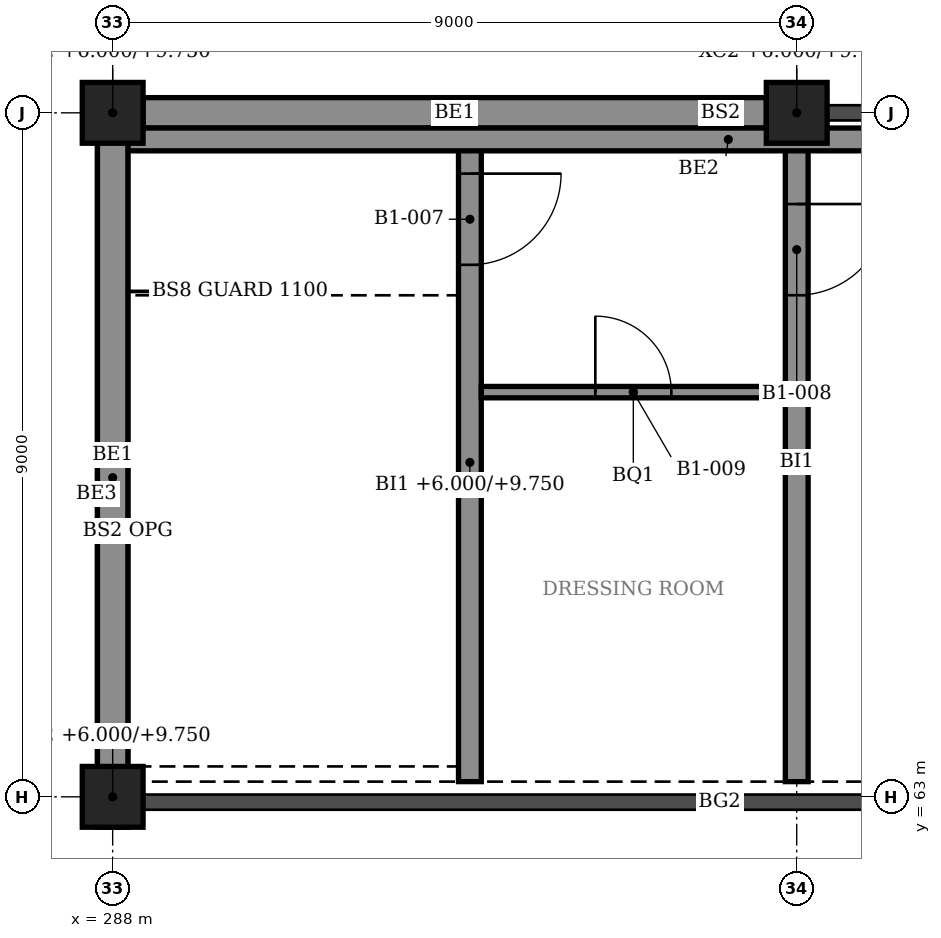
"""IFC4 building model, lengths in metres.
Left out: names, types, materials, properties, quantities, classifications, styles, units other than length and angle.
Written with IfcOpenShell. Run it as: python <this file> out.ifc"""

import sys

from ifc_helpers import new_model, si_unit, direction, frame, frame_2d, origin, origin_2d, place, context, subcontext, project, spatial, rectangle, extrude, element, fill, save


model = new_model("IFC4")
c1 = context("Model", 3, precision=1e-05, world=origin(), true_north=direction((0.0, 1.0)))
c2 = subcontext(c1, "Body", "Model", "MODEL_VIEW")
j1 = project(units=[si_unit("LENGTHUNIT", "METRE"), si_unit("PLANEANGLEUNIT", "RADIAN")], contexts=[c1])
p1 = place(None, origin())
s1 = spatial("IfcSite", under=j1, at=p1, CompositionType="ELEMENT")
p2 = place(p1, origin())
s2 = spatial("IfcBuilding", under=s1, at=p2, CompositionType="ELEMENT")
p3 = place(p2, frame((0.0, 0.0, 6.0)))
s3 = spatial("IfcBuildingStorey", under=s2, at=p3, CompositionType="ELEMENT", Elevation=6.0)
for number, where, z_axis, x_axis in (
    (1, (288.0, 63.0, 0.0), (0.0, 0.0, 1.0), (1.0, 0.0, 0.0)),
    (2, (288.0, 72.0, 0.0), (0.0, 0.0, 1.0), (1.0, 0.0, 0.0)),
    (3, (297.0, 72.0, 0.0), (0.0, 0.0, 1.0), (1.0, 0.0, 0.0)),
):
    element("IfcColumn", number, at=place(p3, frame(where, z_axis=z_axis, x_axis=x_axis)), inside=s3, PredefinedType="COLUMN", context=c2, shape_type="SweptSolid", body=[
        extrude(rectangle(XDim=0.8, YDim=0.8, at=origin_2d()), origin(), (0.0, 0.0, 1.0), 3.75),
    ])
p4 = place(p2, origin())
s4 = spatial("IfcBuildingStorey", under=s2, at=p4, CompositionType="ELEMENT", Elevation=0.0)
p5 = place(p4, frame((288.4, 63.0, -0.3), z_axis=(0.0, 0.0, 1.0), x_axis=(1.0, 0.0, 0.0)))
e4 = element("IfcWall", 4, at=p5, inside=s4, PredefinedType="SHEAR", context=c2, shape_type="SweptSolid", body=[
    extrude(rectangle(XDim=62.2, YDim=0.4, at=frame_2d((31.1, 0.0))), origin(), (0.0, 0.0, 1.0), 10.625),
])
p6 = place(p5, frame((14.25, 0.0, 0.3)))
e5 = element("IfcOpeningElement", 5, at=p6, cuts=e4, PredefinedType="OPENING", context=c2, shape_type="SweptSolid", body=[
    extrude(rectangle(XDim=2.7, YDim=2.4, at=frame_2d((1.35, 1.2))), frame((0.0, 0.21, 0.0), z_axis=(0.0, -1.0, 0.0), x_axis=(1.0, 0.0, 0.0)), (0.0, 0.0, 1.0), 0.42),
])
p7 = place(p5, frame((19.45, 0.0, 0.3)))
e6 = element("IfcOpeningElement", 6, at=p7, cuts=e4, PredefinedType="OPENING", context=c2, shape_type="SweptSolid", body=[
    extrude(rectangle(XDim=2.7, YDim=2.4, at=frame_2d((1.35, 1.2))), frame((0.0, 0.21, 0.0), z_axis=(0.0, -1.0, 0.0), x_axis=(1.0, 0.0, 0.0)), (0.0, 0.0, 1.0), 0.42),
])
p8 = place(p5, frame((24.65, 0.0, 0.3)))
e7 = element("IfcOpeningElement", 7, at=p8, cuts=e4, PredefinedType="OPENING", context=c2, shape_type="SweptSolid", body=[
    extrude(rectangle(XDim=2.7, YDim=2.4, at=frame_2d((1.35, 1.2))), frame((0.0, 0.21, 0.0), z_axis=(0.0, -1.0, 0.0), x_axis=(1.0, 0.0, 0.0)), (0.0, 0.0, 1.0), 0.42),
])
p9 = place(p5, frame((29.85, 0.0, 0.3)))
e8 = element("IfcOpeningElement", 8, at=p9, cuts=e4, PredefinedType="OPENING", context=c2, shape_type="SweptSolid", body=[
    extrude(rectangle(XDim=2.7, YDim=2.4, at=frame_2d((1.35, 1.2))), frame((0.0, 0.21, 0.0), z_axis=(0.0, -1.0, 0.0), x_axis=(1.0, 0.0, 0.0)), (0.0, 0.0, 1.0), 0.42),
])
p10 = place(p5, frame((35.05, 0.0, 0.3)))
e9 = element("IfcOpeningElement", 9, at=p10, cuts=e4, PredefinedType="OPENING", context=c2, shape_type="SweptSolid", body=[
    extrude(rectangle(XDim=2.7, YDim=2.4, at=frame_2d((1.35, 1.2))), frame((0.0, 0.21, 0.0), z_axis=(0.0, -1.0, 0.0), x_axis=(1.0, 0.0, 0.0)), (0.0, 0.0, 1.0), 0.42),
])
p11 = place(p5, frame((40.25, 0.0, 0.3)))
e10 = element("IfcOpeningElement", 10, at=p11, cuts=e4, PredefinedType="OPENING", context=c2, shape_type="SweptSolid", body=[
    extrude(rectangle(XDim=2.7, YDim=2.4, at=frame_2d((1.35, 1.2))), frame((0.0, 0.21, 0.0), z_axis=(0.0, -1.0, 0.0), x_axis=(1.0, 0.0, 0.0)), (0.0, 0.0, 1.0), 0.42),
])
p12 = place(p5, frame((45.45, 0.0, 0.3)))
e11 = element("IfcOpeningElement", 11, at=p12, cuts=e4, PredefinedType="OPENING", context=c2, shape_type="SweptSolid", body=[
    extrude(rectangle(XDim=2.7, YDim=2.4, at=frame_2d((1.35, 1.2))), frame((0.0, 0.21, 0.0), z_axis=(0.0, -1.0, 0.0), x_axis=(1.0, 0.0, 0.0)), (0.0, 0.0, 1.0), 0.42),
])
for number, where, z_axis, x_axis in (
    (12, (288.0, 63.4, 0.0), (0.0, 0.0, 1.0), (0.0, 1.0, 0.0)),
    (13, (288.4, 72.0, 0.0), (0.0, 0.0, 1.0), (1.0, 0.0, 0.0)),
):
    element("IfcWall", number, at=place(p3, frame(where, z_axis=z_axis, x_axis=x_axis)), inside=s3, PredefinedType="STANDARD", context=c2, shape_type="SweptSolid", body=[
        extrude(rectangle(XDim=8.2, YDim=0.4, at=frame_2d((4.1, 0.0))), origin(), (0.0, 0.0, 1.0), 3.05),
    ])
p13 = place(p3, frame((288.0, 62.6, 4.0), z_axis=(0.0, 0.0, 1.0), x_axis=(0.0, 1.0, 0.0)))
e14 = element("IfcWall", 14, at=p13, inside=s3, PredefinedType="PARAPET", context=c2, shape_type="SweptSolid", body=[
    extrude(rectangle(XDim=9.2, YDim=0.4, at=frame_2d((4.6, 0.0))), origin(), (0.0, 0.0, 1.0), 1.121),
])
p14 = place(p3, frame((288.2, 71.65, 4.0), z_axis=(0.0, 0.0, 1.0), x_axis=(1.0, 0.0, 0.0)))
e15 = element("IfcWall", 15, at=p14, inside=s3, PredefinedType="PARAPET", context=c2, shape_type="SweptSolid", body=[
    extrude(rectangle(XDim=62.6, YDim=0.3, at=frame_2d((31.3, 0.0))), origin(), (0.0, 0.0, 1.0), 1.121),
])
p15 = place(p3, frame((292.7, 63.2, 0.0), z_axis=(0.0, 0.0, 1.0), x_axis=(0.0, 1.0, 0.0)))
e16 = element("IfcWall", 16, at=p15, inside=s3, PredefinedType="STANDARD", context=c2, shape_type="SweptSolid", body=[
    extrude(rectangle(XDim=8.4, YDim=0.3, at=frame_2d((4.2, 0.0))), origin(), (0.0, 0.0, 1.0), 3.75),
])
p16 = place(p15, frame((6.8, 0.0, 0.0)))
e17 = element("IfcOpeningElement", 17, at=p16, cuts=e16, PredefinedType="OPENING", context=c2, shape_type="SweptSolid", body=[
    extrude(rectangle(XDim=1.2, YDim=2.4, at=frame_2d((0.6, 1.2))), frame((0.0, 0.16, 0.0), z_axis=(0.0, -1.0, 0.0), x_axis=(1.0, 0.0, 0.0)), (0.0, 0.0, 1.0), 0.32),
])
p17 = place(p3, frame((297.0, 63.2, 0.0), z_axis=(0.0, 0.0, 1.0), x_axis=(0.0, 1.0, 0.0)))
e18 = element("IfcWall", 18, at=p17, inside=s3, PredefinedType="STANDARD", context=c2, shape_type="SweptSolid", body=[
    extrude(rectangle(XDim=8.4, YDim=0.3, at=frame_2d((4.2, 0.0))), origin(), (0.0, 0.0, 1.0), 3.05),
])
p18 = place(p17, frame((6.4, 0.0, 0.0)))
e19 = element("IfcOpeningElement", 19, at=p18, cuts=e18, PredefinedType="OPENING", context=c2, shape_type="SweptSolid", body=[
    extrude(rectangle(XDim=1.2, YDim=2.4, at=frame_2d((0.6, 1.2))), frame((0.0, 0.16, 0.0), z_axis=(0.0, -1.0, 0.0), x_axis=(1.0, 0.0, 0.0)), (0.0, 0.0, 1.0), 0.32),
])
p19 = place(p3, frame((292.85, 68.325, 0.0), z_axis=(0.0, 0.0, 1.0), x_axis=(1.0, 0.0, 0.0)))
e20 = element("IfcWall", 20, at=p19, inside=s3, PredefinedType="PARTITIONING", context=c2, shape_type="SweptSolid", body=[
    extrude(rectangle(XDim=4.0, YDim=0.15, at=frame_2d((2.0, 0.0))), origin(), (0.0, 0.0, 1.0), 3.75),
])
p20 = place(p19, frame((1.5, 0.0, 0.0)))
e21 = element("IfcOpeningElement", 21, at=p20, cuts=e20, PredefinedType="OPENING", context=c2, shape_type="SweptSolid", body=[
    extrude(rectangle(XDim=1.0, YDim=2.4, at=frame_2d((0.5, 1.2))), frame((0.0, 0.085, 0.0), z_axis=(0.0, -1.0, 0.0), x_axis=(1.0, 0.0, 0.0)), (0.0, 0.0, 1.0), 0.17),
])
p21 = place(p16, frame((1.2, 0.0, 0.0), z_axis=(0.0, 0.0, 1.0), x_axis=(-1.0, 0.0, 0.0)))
e22 = element("IfcDoor", 22, at=p21, inside=s3, OperationType="SINGLE_SWING_RIGHT", PredefinedType="DOOR", context=c2, shape_type="SweptSolid", body=[
    extrude(rectangle(XDim=1.2, YDim=2.4, at=frame_2d((0.6, 1.2))), frame((0.0, 0.025, 0.0), z_axis=(0.0, -1.0, 0.0), x_axis=(1.0, 0.0, 0.0)), (0.0, 0.0, 1.0), 0.05),
])
fill(e17, e22)
p22 = place(p18, frame((1.2, 0.0, 0.0), z_axis=(0.0, 0.0, 1.0), x_axis=(-1.0, 0.0, 0.0)))
e23 = element("IfcDoor", 23, at=p22, inside=s3, OperationType="SINGLE_SWING_RIGHT", PredefinedType="DOOR", context=c2, shape_type="SweptSolid", body=[
    extrude(rectangle(XDim=1.2, YDim=2.4, at=frame_2d((0.6, 1.2))), frame((0.0, 0.025, 0.0), z_axis=(0.0, -1.0, 0.0), x_axis=(1.0, 0.0, 0.0)), (0.0, 0.0, 1.0), 0.05),
])
fill(e19, e23)
p23 = place(p20, origin())
e24 = element("IfcDoor", 24, at=p23, inside=s3, OperationType="SINGLE_SWING_LEFT", PredefinedType="DOOR", context=c2, shape_type="SweptSolid", body=[
    extrude(rectangle(XDim=1.0, YDim=2.4, at=frame_2d((0.5, 1.2))), frame((0.0, 0.025, 0.0), z_axis=(0.0, -1.0, 0.0), x_axis=(1.0, 0.0, 0.0)), (0.0, 0.0, 1.0), 0.05),
])
fill(e21, e24)
save(model, sys.argv[1])
